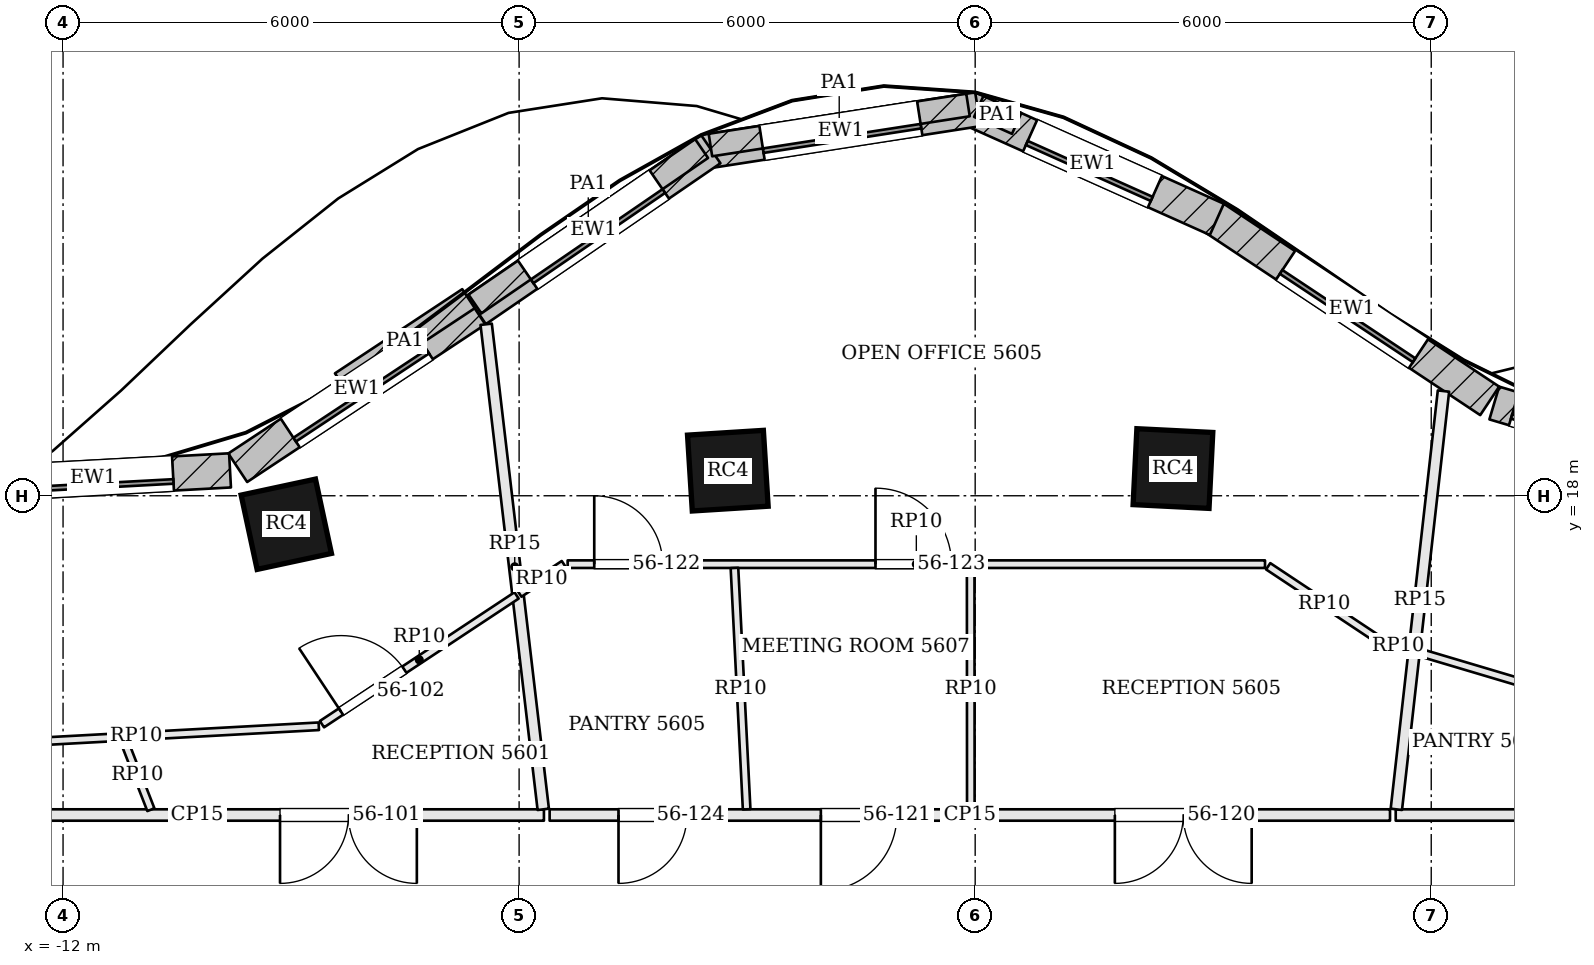
"""IFC4 building model, lengths in metres.
Left out: names, types, materials, properties, quantities, classifications, styles, units other than length and angle.
Written with IfcOpenShell. Run it as: python <this file> out.ifc"""

import sys

from ifc_helpers import new_model, si_unit, direction, frame, frame_2d, origin, origin_2d, place, context, subcontext, project, spatial, rectangle, extrude, element, fill, save


model = new_model("IFC4")
c1 = context("Model", 3, precision=1e-05, world=origin(), true_north=direction((0.0, 1.0)))
c2 = subcontext(c1, "Body", "Model", "MODEL_VIEW")
j1 = project(units=[si_unit("LENGTHUNIT", "METRE"), si_unit("PLANEANGLEUNIT", "RADIAN")], contexts=[c1])
p1 = place(None, origin())
s1 = spatial("IfcSite", under=j1, at=p1, CompositionType="ELEMENT")
p2 = place(p1, origin())
s2 = spatial("IfcBuilding", under=s1, at=p2, CompositionType="ELEMENT")
p3 = place(p2, frame((0.0, 0.0, 229.2)))
s3 = spatial("IfcBuildingStorey", under=s2, at=p3, CompositionType="ELEMENT", Elevation=229.2)
for number, where, z_axis, x_axis in (
    (1, (2.602, 18.358, 0.0), (0.0, 0.0, 1.0), (-0.999, 0.05, 0.0)),
    (2, (-3.254, 18.33, 0.0), (0.0, 0.0, 1.0), (-0.998, -0.063, 0.0)),
    (3, (-9.063, 17.625, 0.0), (0.0, 0.0, 1.0), (-0.978, -0.21, 0.0)),
):
    element("IfcColumn", number, at=place(p3, frame(where, z_axis=z_axis, x_axis=x_axis)), inside=s3, PredefinedType="COLUMN", context=c2, shape_type="SweptSolid", body=[
        extrude(rectangle(XDim=1.0, YDim=1.0, at=origin_2d()), origin(), (0.0, 0.0, 1.0), 3.9),
    ])
p4 = place(p3, frame((9.357, 18.469, 0.0), z_axis=(0.0, 0.0, 1.0), x_axis=(-0.958524054629, 0.285011643091, 0.0)))
e4 = element("IfcWall", 4, at=p4, inside=s3, PredefinedType="SOLIDWALL", context=c2, shape_type="SweptSolid", body=[
    extrude(rectangle(XDim=2.637, YDim=0.45, at=frame_2d((1.319, 0.0))), origin(), (0.0, 0.0, 1.0), 3.7),
])
p5 = place(p4, frame((0.269, 0.0, 0.9)))
e5 = element("IfcOpeningElement", 5, at=p5, cuts=e4, PredefinedType="OPENING", context=c2, shape_type="SweptSolid", body=[
    extrude(rectangle(XDim=2.1, YDim=2.3, at=frame_2d((1.05, 1.15))), frame((0.0, 0.235, 0.0), z_axis=(0.0, -1.0, 0.0), x_axis=(1.0, 0.0, 0.0)), (0.0, 0.0, 1.0), 0.47),
])
p6 = place(p3, frame((6.769, 19.248, 0.0), z_axis=(0.0, 0.0, 1.0), x_axis=(-0.832973379274, 0.553313066375, 0.0)))
e6 = element("IfcWall", 6, at=p6, inside=s3, PredefinedType="SOLIDWALL", context=c2, shape_type="SweptSolid", body=[
    extrude(rectangle(XDim=4.348, YDim=0.45, at=frame_2d((2.174, 0.0))), origin(), (0.0, 0.0, 1.0), 3.7),
])
p7 = place(p6, frame((1.124, 0.0, 0.9)))
e7 = element("IfcOpeningElement", 7, at=p7, cuts=e6, PredefinedType="OPENING", context=c2, shape_type="SweptSolid", body=[
    extrude(rectangle(XDim=2.1, YDim=2.3, at=frame_2d((1.05, 1.15))), frame((0.0, 0.235, 0.0), z_axis=(0.0, -1.0, 0.0), x_axis=(1.0, 0.0, 0.0)), (0.0, 0.0, 1.0), 0.47),
])
p8 = place(p3, frame((3.179, 21.636, 0.0), z_axis=(0.0, 0.0, 1.0), x_axis=(-0.912608353595, 0.40883492139, 0.0)))
e8 = element("IfcWall", 8, at=p8, inside=s3, PredefinedType="SOLIDWALL", context=c2, shape_type="SweptSolid", body=[
    extrude(rectangle(XDim=3.585, YDim=0.45, at=frame_2d((1.792, 0.0))), origin(), (0.0, 0.0, 1.0), 3.7),
])
p9 = place(p8, frame((0.892, 0.0, 0.9)))
e9 = element("IfcOpeningElement", 9, at=p9, cuts=e8, PredefinedType="OPENING", context=c2, shape_type="SweptSolid", body=[
    extrude(rectangle(XDim=1.8, YDim=2.3, at=frame_2d((0.9, 1.15))), frame((0.0, 0.235, 0.0), z_axis=(0.0, -1.0, 0.0), x_axis=(1.0, 0.0, 0.0)), (0.0, 0.0, 1.0), 0.47),
])
p10 = place(p3, frame((0.035, 23.085, 0.0), z_axis=(0.0, 0.0, 1.0), x_axis=(-0.988133637562, -0.153596596054, 0.0)))
e10 = element("IfcWall", 10, at=p10, inside=s3, PredefinedType="SOLIDWALL", context=c2, shape_type="SweptSolid", body=[
    extrude(rectangle(XDim=3.646, YDim=0.45, at=frame_2d((1.823, 0.0))), origin(), (0.0, 0.0, 1.0), 3.7),
])
p11 = place(p10, frame((0.773, 0.0, 0.9)))
e11 = element("IfcOpeningElement", 11, at=p11, cuts=e10, PredefinedType="OPENING", context=c2, shape_type="SweptSolid", body=[
    extrude(rectangle(XDim=2.1, YDim=2.3, at=frame_2d((1.05, 1.15))), frame((0.0, 0.235, 0.0), z_axis=(0.0, -1.0, 0.0), x_axis=(1.0, 0.0, 0.0)), (0.0, 0.0, 1.0), 0.47),
])
p12 = place(p3, frame((-3.479, 22.56, 0.0), z_axis=(0.0, 0.0, 1.0), x_axis=(-0.824722766417, -0.565537230033, 0.0)))
e12 = element("IfcWall", 12, at=p12, inside=s3, PredefinedType="SOLIDWALL", context=c2, shape_type="SweptSolid", body=[
    extrude(rectangle(XDim=3.742, YDim=0.45, at=frame_2d((1.871, 0.0))), origin(), (0.0, 0.0, 1.0), 3.7),
])
p13 = place(p12, frame((0.821, 0.0, 0.9)))
e13 = element("IfcOpeningElement", 13, at=p13, cuts=e12, PredefinedType="OPENING", context=c2, shape_type="SweptSolid", body=[
    extrude(rectangle(XDim=2.1, YDim=2.3, at=frame_2d((1.05, 1.15))), frame((0.0, 0.235, 0.0), z_axis=(0.0, -1.0, 0.0), x_axis=(1.0, 0.0, 0.0)), (0.0, 0.0, 1.0), 0.47),
])
p14 = place(p3, frame((-6.568, 20.441, 0.0), z_axis=(0.0, 0.0, 1.0), x_axis=(-0.834034214531, -0.551712723246, 0.0)))
e14 = element("IfcWall", 14, at=p14, inside=s3, PredefinedType="SOLIDWALL", context=c2, shape_type="SweptSolid", body=[
    extrude(rectangle(XDim=3.757, YDim=0.45, at=frame_2d((1.879, 0.0))), origin(), (0.0, 0.0, 1.0), 3.7),
])
p15 = place(p14, frame((0.829, 0.0, 0.9)))
e15 = element("IfcOpeningElement", 15, at=p15, cuts=e14, PredefinedType="OPENING", context=c2, shape_type="SweptSolid", body=[
    extrude(rectangle(XDim=2.1, YDim=2.3, at=frame_2d((1.05, 1.15))), frame((0.0, 0.235, 0.0), z_axis=(0.0, -1.0, 0.0), x_axis=(1.0, 0.0, 0.0)), (0.0, 0.0, 1.0), 0.47),
])
p16 = place(p3, frame((-9.803, 18.334, 0.0), z_axis=(0.0, 0.0, 1.0), x_axis=(-0.998525941495, -0.054276552602, 0.0)))
e16 = element("IfcWall", 16, at=p16, inside=s3, PredefinedType="SOLIDWALL", context=c2, shape_type="SweptSolid", body=[
    extrude(rectangle(XDim=3.603, YDim=0.45, at=frame_2d((1.802, 0.0))), origin(), (0.0, 0.0, 1.0), 3.7),
])
p17 = place(p16, frame((0.751, 0.0, 0.9)))
e17 = element("IfcOpeningElement", 17, at=p17, cuts=e16, PredefinedType="OPENING", context=c2, shape_type="SweptSolid", body=[
    extrude(rectangle(XDim=2.1, YDim=2.3, at=frame_2d((1.05, 1.15))), frame((0.0, 0.235, 0.0), z_axis=(0.0, -1.0, 0.0), x_axis=(1.0, 0.0, 0.0)), (0.0, 0.0, 1.0), 0.47),
])
p18 = place(p3, frame((0.545, 22.898, 3.9), z_axis=(0.0, 0.0, 1.0), x_axis=(-0.912497815069, 0.409081578044, 0.0)))
e18 = element("IfcWall", 18, at=p18, inside=s3, PredefinedType="PARAPET", context=c2, shape_type="SweptSolid", body=[
    extrude(rectangle(XDim=0.546, YDim=0.3, at=frame_2d((0.273, 0.0))), origin(), (0.0, 0.0, 1.0), 1.1),
])
p19 = place(p3, frame((-0.094, 23.14, 3.9), z_axis=(0.0, 0.0, 1.0), x_axis=(-0.988150084887, -0.153490748056, 0.0)))
e19 = element("IfcWall", 19, at=p19, inside=s3, PredefinedType="PARAPET", context=c2, shape_type="SweptSolid", body=[
    extrude(rectangle(XDim=3.429, YDim=0.3, at=frame_2d((1.715, 0.0))), origin(), (0.0, 0.0, 1.0), 1.1),
])
p20 = place(p3, frame((-3.599, 22.568, 3.9), z_axis=(0.0, 0.0, 1.0), x_axis=(-0.82476034254, -0.565482428881, 0.0)))
e20 = element("IfcWall", 20, at=p20, inside=s3, PredefinedType="PARAPET", context=c2, shape_type="SweptSolid", body=[
    extrude(rectangle(XDim=3.616, YDim=0.3, at=frame_2d((1.808, 0.0))), origin(), (0.0, 0.0, 1.0), 1.1),
])
p21 = place(p3, frame((-6.665, 20.593, 3.9), z_axis=(0.0, 0.0, 1.0), x_axis=(-0.834027642059, -0.551722658843, 0.0)))
e21 = element("IfcWall", 21, at=p21, inside=s3, PredefinedType="PARAPET", context=c2, shape_type="SweptSolid", body=[
    extrude(rectangle(XDim=2.008, YDim=0.3, at=frame_2d((1.004, 0.0))), origin(), (0.0, 0.0, 1.0), 1.1),
])
p22 = place(p3, frame((-5.674, 13.8, 0.0), z_axis=(0.0, 0.0, 1.0), x_axis=(-1.0, 0.0, 0.0)))
e22 = element("IfcWall", 22, at=p22, inside=s3, PredefinedType="PARTITIONING", context=c2, shape_type="SweptSolid", body=[
    extrude(rectangle(XDim=9.126, YDim=0.15, at=frame_2d((4.563, 0.0))), origin(), (0.0, 0.0, 1.0), 3.084),
])
p23 = place(p22, frame((1.672, 0.0, 0.0)))
e23 = element("IfcOpeningElement", 23, at=p23, cuts=e22, PredefinedType="OPENING", context=c2, shape_type="SweptSolid", body=[
    extrude(rectangle(XDim=1.8, YDim=2.1, at=frame_2d((0.9, 1.05))), frame((0.0, 0.085, 0.0), z_axis=(0.0, -1.0, 0.0), x_axis=(1.0, 0.0, 0.0)), (0.0, 0.0, 1.0), 0.17),
])
p24 = place(p3, frame((-6.433, 20.256, 0.0), z_axis=(0.0, 0.0, 1.0), x_axis=(0.116872110209, -0.993146972938, 0.0)))
e24 = element("IfcWall", 24, at=p24, inside=s3, PredefinedType="PARTITIONING", context=c2, shape_type="SweptSolid", body=[
    extrude(rectangle(XDim=6.426, YDim=0.15, at=frame_2d((3.213, 0.0))), origin(), (0.0, 0.0, 1.0), 3.234),
])
p25 = place(p3, frame((14.725, 13.8, 0.0), z_axis=(0.0, 0.0, 1.0), x_axis=(-1.0, 0.0, 0.0)))
e25 = element("IfcWall", 25, at=p25, inside=s3, PredefinedType="PARTITIONING", context=c2, shape_type="SweptSolid", body=[
    extrude(rectangle(XDim=9.192, YDim=0.15, at=frame_2d((4.596, 0.0))), origin(), (0.0, 0.0, 1.0), 3.084),
])
p26 = place(p3, frame((6.161, 19.377, 0.0), z_axis=(0.0, 0.0, 1.0), x_axis=(-0.11193626313, -0.993715388326, 0.0)))
e26 = element("IfcWall", 26, at=p26, inside=s3, PredefinedType="PARTITIONING", context=c2, shape_type="SweptSolid", body=[
    extrude(rectangle(XDim=5.538, YDim=0.15, at=frame_2d((2.769, 0.0))), origin(), (0.0, 0.0, 1.0), 3.234),
])
p27 = place(p3, frame((5.458, 13.8, 0.0), z_axis=(0.0, 0.0, 1.0), x_axis=(-1.0, 0.0, 0.0)))
e27 = element("IfcWall", 27, at=p27, inside=s3, PredefinedType="PARTITIONING", context=c2, shape_type="SweptSolid", body=[
    extrude(rectangle(XDim=11.056, YDim=0.15, at=frame_2d((5.528, 0.0))), origin(), (0.0, 0.0, 1.0), 3.084),
])
p28 = place(p27, frame((1.82, 0.0, 0.0)))
e28 = element("IfcOpeningElement", 28, at=p28, cuts=e27, PredefinedType="OPENING", context=c2, shape_type="SweptSolid", body=[
    extrude(rectangle(XDim=1.8, YDim=2.1, at=frame_2d((0.9, 1.05))), frame((0.0, 0.085, 0.0), z_axis=(0.0, -1.0, 0.0), x_axis=(1.0, 0.0, 0.0)), (0.0, 0.0, 1.0), 0.17),
])
p29 = place(p27, frame((6.488, 0.0, 0.0)))
e29 = element("IfcOpeningElement", 29, at=p29, cuts=e27, PredefinedType="OPENING", context=c2, shape_type="SweptSolid", body=[
    extrude(rectangle(XDim=1.0, YDim=2.4, at=frame_2d((0.5, 1.2))), frame((0.0, 0.085, 0.0), z_axis=(0.0, -1.0, 0.0), x_axis=(1.0, 0.0, 0.0)), (0.0, 0.0, 1.0), 0.17),
])
p30 = place(p27, frame((9.25, 0.0, 0.0)))
e30 = element("IfcOpeningElement", 30, at=p30, cuts=e27, PredefinedType="OPENING", context=c2, shape_type="SweptSolid", body=[
    extrude(rectangle(XDim=0.9, YDim=2.1, at=frame_2d((0.45, 1.05))), frame((0.0, 0.085, 0.0), z_axis=(0.0, -1.0, 0.0), x_axis=(1.0, 0.0, 0.0)), (0.0, 0.0, 1.0), 0.17),
])
p31 = place(p3, frame((-13.437, 14.706, 0.0), z_axis=(0.0, 0.0, 1.0), x_axis=(0.998525882111, 0.054277645072, 0.0)))
e31 = element("IfcWall", 31, at=p31, inside=s3, PredefinedType="PARTITIONING", context=c2, shape_type="SweptSolid", body=[
    extrude(rectangle(XDim=4.808, YDim=0.1, at=frame_2d((2.404, 0.0))), origin(), (0.0, 0.0, 1.0), 3.084),
])
p32 = place(p3, frame((-8.594, 14.995, 0.0), z_axis=(0.0, 0.0, 1.0), x_axis=(0.834051692878, 0.5516863, 0.0)))
e32 = element("IfcWall", 32, at=p32, inside=s3, PredefinedType="PARTITIONING", context=c2, shape_type="SweptSolid", body=[
    extrude(rectangle(XDim=3.069, YDim=0.1, at=frame_2d((1.535, 0.0))), origin(), (0.0, 0.0, 1.0), 3.084),
])
p33 = place(p32, frame((0.3, 0.0, 0.0)))
e33 = element("IfcOpeningElement", 33, at=p33, cuts=e32, PredefinedType="OPENING", context=c2, shape_type="SweptSolid", body=[
    extrude(rectangle(XDim=1.0, YDim=2.1, at=frame_2d((0.5, 1.05))), frame((0.0, 0.06, 0.0), z_axis=(0.0, -1.0, 0.0), x_axis=(1.0, 0.0, 0.0)), (0.0, 0.0, 1.0), 0.12),
])
p34 = place(p3, frame((-10.845, 13.87, 0.0), z_axis=(0.0, 0.0, 1.0), x_axis=(-0.362759705936, 0.931882715662, 0.0)))
e34 = element("IfcWall", 34, at=p34, inside=s3, PredefinedType="PARTITIONING", context=c2, shape_type="SweptSolid", body=[
    extrude(rectangle(XDim=0.977, YDim=0.1, at=frame_2d((0.489, 0.0))), origin(), (0.0, 0.0, 1.0), 3.084),
])
p35 = place(p3, frame((5.795, 15.954, 0.0), z_axis=(0.0, 0.0, 1.0), x_axis=(0.95851298226, -0.285048877981, 0.0)))
e35 = element("IfcWall", 35, at=p35, inside=s3, PredefinedType="PARTITIONING", context=c2, shape_type="SweptSolid", body=[
    extrude(rectangle(XDim=3.548, YDim=0.1, at=frame_2d((1.774, 0.0))), origin(), (0.0, 0.0, 1.0), 3.084),
])
p36 = place(p3, frame((-5.996, 16.713, 0.0), z_axis=(0.0, 0.0, 1.0), x_axis=(0.833814325364, 0.55204498985, 0.0)))
e36 = element("IfcWall", 36, at=p36, inside=s3, PredefinedType="PARTITIONING", context=c2, shape_type="SweptSolid", body=[
    extrude(rectangle(XDim=0.701, YDim=0.1, at=frame_2d((0.351, 0.0))), origin(), (0.0, 0.0, 1.0), 3.084),
])
p37 = place(p3, frame((-5.362, 17.1, 0.0), z_axis=(0.0, 0.0, 1.0), x_axis=(1.0, 0.0, 0.0)))
e37 = element("IfcWall", 37, at=p37, inside=s3, PredefinedType="PARTITIONING", context=c2, shape_type="SweptSolid", body=[
    extrude(rectangle(XDim=9.175, YDim=0.1, at=frame_2d((4.587, 0.0))), origin(), (0.0, 0.0, 1.0), 3.084),
])
p38 = place(p37, frame((0.35, 0.0, 0.0)))
e38 = element("IfcOpeningElement", 38, at=p38, cuts=e37, PredefinedType="OPENING", context=c2, shape_type="SweptSolid", body=[
    extrude(rectangle(XDim=0.9, YDim=2.1, at=frame_2d((0.45, 1.05))), frame((0.0, 0.06, 0.0), z_axis=(0.0, -1.0, 0.0), x_axis=(1.0, 0.0, 0.0)), (0.0, 0.0, 1.0), 0.12),
])
p39 = place(p37, frame((4.05, 0.0, 0.0)))
e39 = element("IfcOpeningElement", 39, at=p39, cuts=e37, PredefinedType="OPENING", context=c2, shape_type="SweptSolid", body=[
    extrude(rectangle(XDim=1.0, YDim=2.4, at=frame_2d((0.5, 1.2))), frame((0.0, 0.06, 0.0), z_axis=(0.0, -1.0, 0.0), x_axis=(1.0, 0.0, 0.0)), (0.0, 0.0, 1.0), 0.12),
])
p40 = place(p3, frame((3.855, 17.072, 0.0), z_axis=(0.0, 0.0, 1.0), x_axis=(0.832961782109, -0.553330524683, 0.0)))
e40 = element("IfcWall", 40, at=p40, inside=s3, PredefinedType="PARTITIONING", context=c2, shape_type="SweptSolid", body=[
    extrude(rectangle(XDim=1.77, YDim=0.1, at=frame_2d((0.885, 0.0))), origin(), (0.0, 0.0, 1.0), 3.084),
])
p41 = place(p3, frame((5.377, 16.079, 0.0), z_axis=(0.0, 0.0, 1.0), x_axis=(0.958536356279, -0.284970268083, 0.0)))
e41 = element("IfcWall", 41, at=p41, inside=s3, PredefinedType="PARTITIONING", context=c2, shape_type="SweptSolid", body=[
    extrude(rectangle(XDim=0.396, YDim=0.1, at=frame_2d((0.198, 0.0))), origin(), (0.0, 0.0, 1.0), 3.084),
])
p42 = place(p3, frame((-0.057, 13.875, 0.0), z_axis=(0.0, 0.0, 1.0), x_axis=(-0.000615147904, 0.999999810797, 0.0)))
e42 = element("IfcWall", 42, at=p42, inside=s3, PredefinedType="PARTITIONING", context=c2, shape_type="SweptSolid", body=[
    extrude(rectangle(XDim=3.175, YDim=0.1, at=frame_2d((1.587, 0.0))), origin(), (0.0, 0.0, 1.0), 3.084),
])
p43 = place(p3, frame((-3.007, 13.875, 0.0), z_axis=(0.0, 0.0, 1.0), x_axis=(-0.050454687636, 0.998726351157, 0.0)))
e43 = element("IfcWall", 43, at=p43, inside=s3, PredefinedType="PARTITIONING", context=c2, shape_type="SweptSolid", body=[
    extrude(rectangle(XDim=3.179, YDim=0.1, at=frame_2d((1.59, 0.0))), origin(), (0.0, 0.0, 1.0), 3.084),
])
p44 = place(p5, origin())
e44 = element("IfcWindow", 44, at=p44, inside=s3, PartitioningType="SINGLE_PANEL", PredefinedType="WINDOW", context=c2, shape_type="SweptSolid", body=[
    extrude(rectangle(XDim=2.1, YDim=2.3, at=frame_2d((1.05, 1.15))), frame((0.0, 0.135, 0.0), z_axis=(0.0, -1.0, 0.0), x_axis=(1.0, 0.0, 0.0)), (0.0, 0.0, 1.0), 0.06),
])
fill(e5, e44)
p45 = place(p7, origin())
e45 = element("IfcWindow", 45, at=p45, inside=s3, PartitioningType="SINGLE_PANEL", PredefinedType="WINDOW", context=c2, shape_type="SweptSolid", body=[
    extrude(rectangle(XDim=2.1, YDim=2.3, at=frame_2d((1.05, 1.15))), frame((0.0, 0.135, 0.0), z_axis=(0.0, -1.0, 0.0), x_axis=(1.0, 0.0, 0.0)), (0.0, 0.0, 1.0), 0.06),
])
fill(e7, e45)
p46 = place(p9, origin())
e46 = element("IfcWindow", 46, at=p46, inside=s3, PartitioningType="SINGLE_PANEL", PredefinedType="WINDOW", context=c2, shape_type="SweptSolid", body=[
    extrude(rectangle(XDim=1.8, YDim=2.3, at=frame_2d((0.9, 1.15))), frame((0.0, 0.135, 0.0), z_axis=(0.0, -1.0, 0.0), x_axis=(1.0, 0.0, 0.0)), (0.0, 0.0, 1.0), 0.06),
])
fill(e9, e46)
p47 = place(p11, origin())
e47 = element("IfcWindow", 47, at=p47, inside=s3, PartitioningType="SINGLE_PANEL", PredefinedType="WINDOW", context=c2, shape_type="SweptSolid", body=[
    extrude(rectangle(XDim=2.1, YDim=2.3, at=frame_2d((1.05, 1.15))), frame((0.0, 0.135, 0.0), z_axis=(0.0, -1.0, 0.0), x_axis=(1.0, 0.0, 0.0)), (0.0, 0.0, 1.0), 0.06),
])
fill(e11, e47)
p48 = place(p13, origin())
e48 = element("IfcWindow", 48, at=p48, inside=s3, PartitioningType="SINGLE_PANEL", PredefinedType="WINDOW", context=c2, shape_type="SweptSolid", body=[
    extrude(rectangle(XDim=2.1, YDim=2.3, at=frame_2d((1.05, 1.15))), frame((0.0, 0.135, 0.0), z_axis=(0.0, -1.0, 0.0), x_axis=(1.0, 0.0, 0.0)), (0.0, 0.0, 1.0), 0.06),
])
fill(e13, e48)
p49 = place(p15, origin())
e49 = element("IfcWindow", 49, at=p49, inside=s3, PartitioningType="SINGLE_PANEL", PredefinedType="WINDOW", context=c2, shape_type="SweptSolid", body=[
    extrude(rectangle(XDim=2.1, YDim=2.3, at=frame_2d((1.05, 1.15))), frame((0.0, 0.135, 0.0), z_axis=(0.0, -1.0, 0.0), x_axis=(1.0, 0.0, 0.0)), (0.0, 0.0, 1.0), 0.06),
])
fill(e15, e49)
p50 = place(p17, origin())
e50 = element("IfcWindow", 50, at=p50, inside=s3, PartitioningType="SINGLE_PANEL", PredefinedType="WINDOW", context=c2, shape_type="SweptSolid", body=[
    extrude(rectangle(XDim=2.1, YDim=2.3, at=frame_2d((1.05, 1.15))), frame((0.0, 0.135, 0.0), z_axis=(0.0, -1.0, 0.0), x_axis=(1.0, 0.0, 0.0)), (0.0, 0.0, 1.0), 0.06),
])
fill(e17, e50)
p51 = place(p23, origin())
e51 = element("IfcDoor", 51, at=p51, inside=s3, OperationType="DOUBLE_DOOR_SINGLE_SWING", PredefinedType="DOOR", context=c2, shape_type="SweptSolid", body=[
    extrude(rectangle(XDim=1.8, YDim=2.1, at=frame_2d((0.9, 1.05))), frame((0.0, 0.025, 0.0), z_axis=(0.0, -1.0, 0.0), x_axis=(1.0, 0.0, 0.0)), (0.0, 0.0, 1.0), 0.05),
])
fill(e23, e51)
p52 = place(p33, origin())
e52 = element("IfcDoor", 52, at=p52, inside=s3, OperationType="SINGLE_SWING_LEFT", PredefinedType="DOOR", context=c2, shape_type="SweptSolid", body=[
    extrude(rectangle(XDim=1.0, YDim=2.1, at=frame_2d((0.5, 1.05))), frame((0.0, 0.025, 0.0), z_axis=(0.0, -1.0, 0.0), x_axis=(1.0, 0.0, 0.0)), (0.0, 0.0, 1.0), 0.05),
])
fill(e33, e52)
p53 = place(p28, origin())
e53 = element("IfcDoor", 53, at=p53, inside=s3, OperationType="DOUBLE_DOOR_SINGLE_SWING", PredefinedType="DOOR", context=c2, shape_type="SweptSolid", body=[
    extrude(rectangle(XDim=1.8, YDim=2.1, at=frame_2d((0.9, 1.05))), frame((0.0, 0.025, 0.0), z_axis=(0.0, -1.0, 0.0), x_axis=(1.0, 0.0, 0.0)), (0.0, 0.0, 1.0), 0.05),
])
fill(e28, e53)
p54 = place(p29, origin())
e54 = element("IfcDoor", 54, at=p54, inside=s3, OperationType="SINGLE_SWING_RIGHT", PredefinedType="DOOR", context=c2, shape_type="SweptSolid", body=[
    extrude(rectangle(XDim=1.0, YDim=2.4, at=frame_2d((0.5, 1.2))), frame((0.0, 0.025, 0.0), z_axis=(0.0, -1.0, 0.0), x_axis=(1.0, 0.0, 0.0)), (0.0, 0.0, 1.0), 0.05),
])
fill(e29, e54)
p55 = place(p38, origin())
e55 = element("IfcDoor", 55, at=p55, inside=s3, OperationType="SINGLE_SWING_LEFT", PredefinedType="DOOR", context=c2, shape_type="SweptSolid", body=[
    extrude(rectangle(XDim=0.9, YDim=2.1, at=frame_2d((0.45, 1.05))), frame((0.0, 0.025, 0.0), z_axis=(0.0, -1.0, 0.0), x_axis=(1.0, 0.0, 0.0)), (0.0, 0.0, 1.0), 0.05),
])
fill(e38, e55)
p56 = place(p39, origin())
e56 = element("IfcDoor", 56, at=p56, inside=s3, OperationType="SINGLE_SWING_LEFT", PredefinedType="DOOR", context=c2, shape_type="SweptSolid", body=[
    extrude(rectangle(XDim=1.0, YDim=2.4, at=frame_2d((0.5, 1.2))), frame((0.0, 0.025, 0.0), z_axis=(0.0, -1.0, 0.0), x_axis=(1.0, 0.0, 0.0)), (0.0, 0.0, 1.0), 0.05),
])
fill(e39, e56)
p57 = place(p30, origin())
e57 = element("IfcDoor", 57, at=p57, inside=s3, OperationType="SINGLE_SWING_RIGHT", PredefinedType="DOOR", context=c2, shape_type="SweptSolid", body=[
    extrude(rectangle(XDim=0.9, YDim=2.1, at=frame_2d((0.45, 1.05))), frame((0.0, 0.025, 0.0), z_axis=(0.0, -1.0, 0.0), x_axis=(1.0, 0.0, 0.0)), (0.0, 0.0, 1.0), 0.05),
])
fill(e30, e57)
save(model, sys.argv[1])
